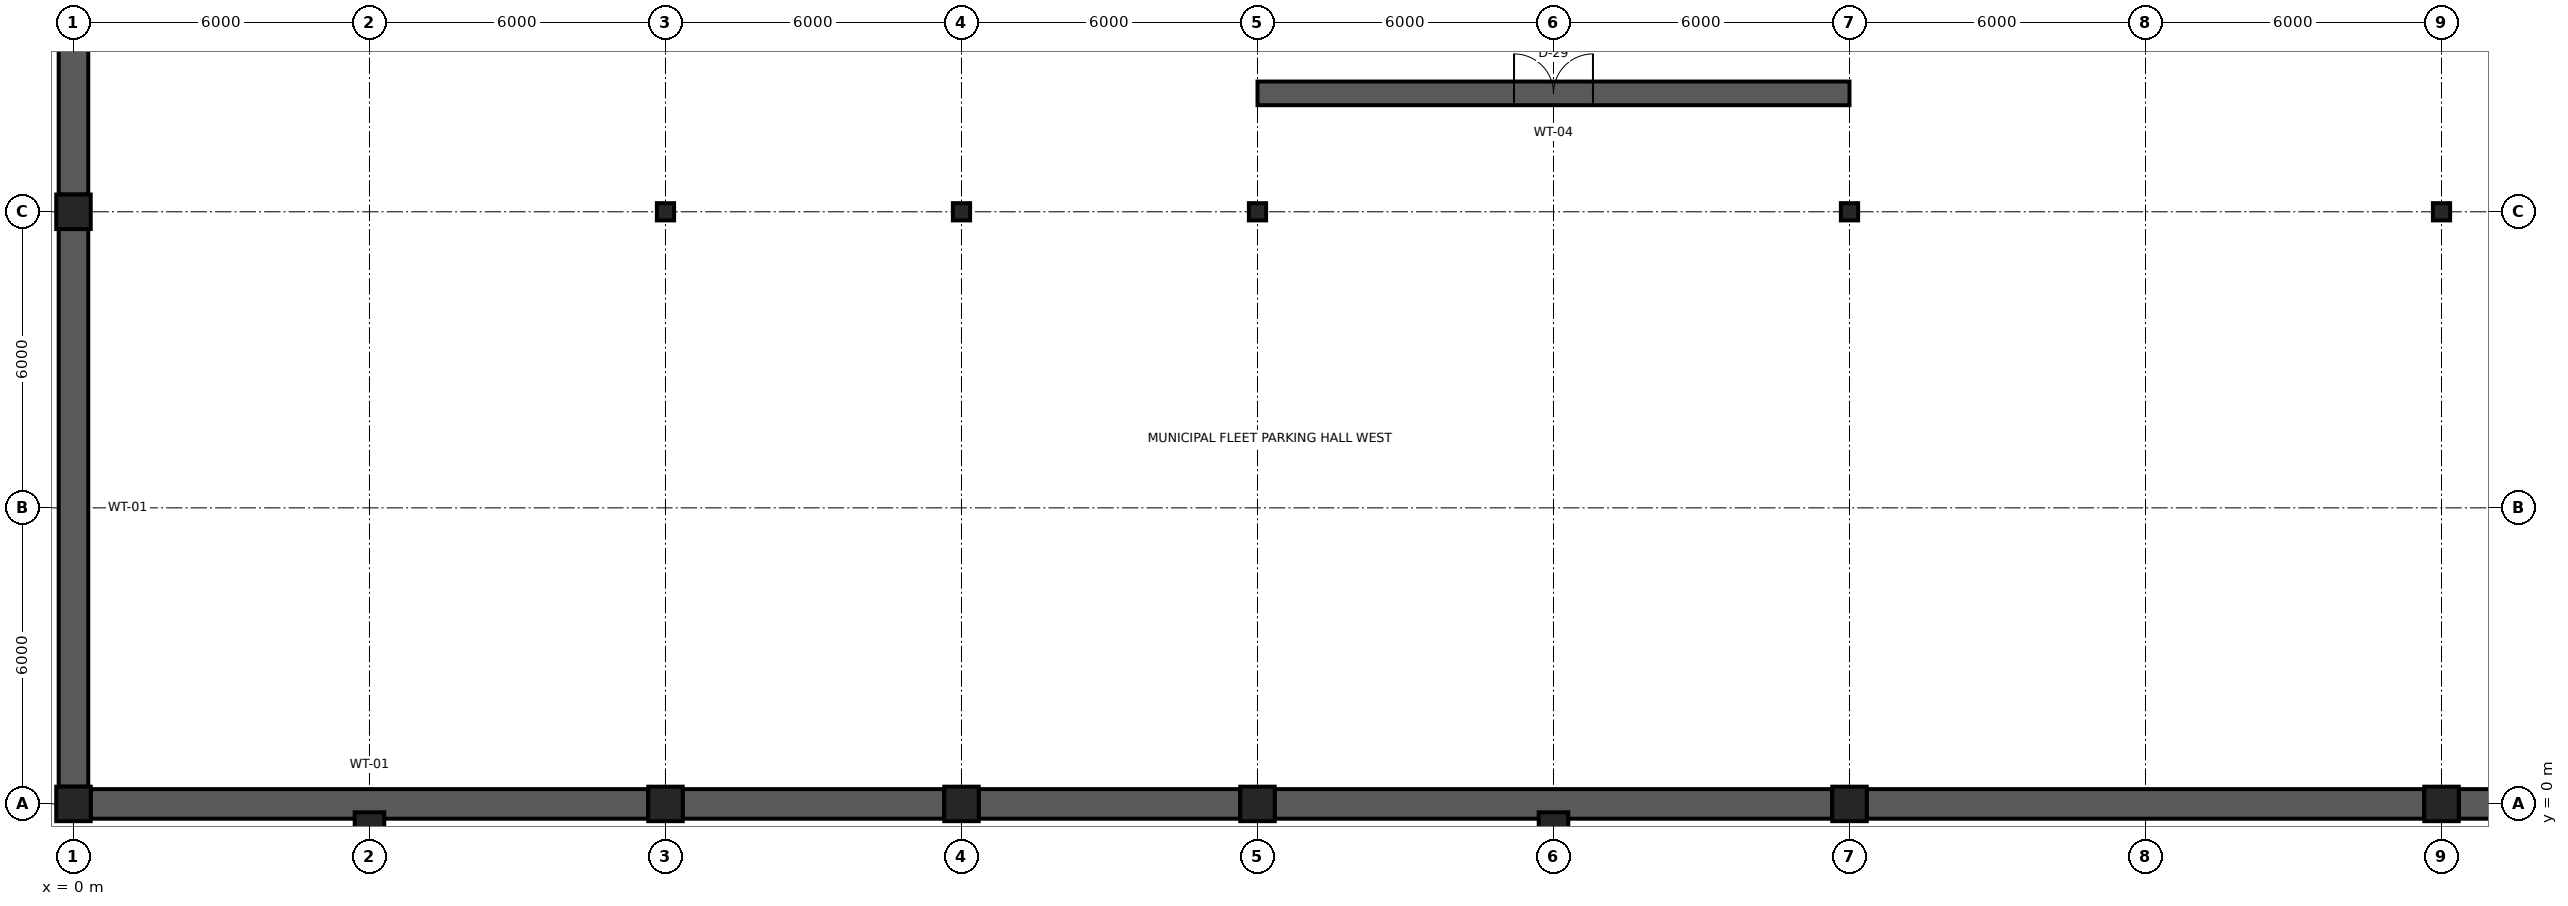
"""IFC4 building model, lengths in metres.
Left out: names, types, materials, properties, quantities, classifications, styles, units other than length and angle.
Written with IfcOpenShell. Run it as: python <this file> out.ifc"""

import sys

from ifc_helpers import new_model, si_unit, direction, frame, frame_2d, origin, origin_2d, place, context, subcontext, project, spatial, rectangle, i_section, extrude, element, fill, save


model = new_model("IFC4")
c1 = context("Model", 3, precision=1e-05, world=origin(), true_north=direction((0.0, 1.0)))
c2 = subcontext(c1, "Body", "Model", "MODEL_VIEW")
j1 = project(units=[si_unit("LENGTHUNIT", "METRE"), si_unit("PLANEANGLEUNIT", "RADIAN")], contexts=[c1])
p1 = place(None, origin())
s1 = spatial("IfcSite", under=j1, at=p1, CompositionType="ELEMENT")
p2 = place(p1, origin())
s2 = spatial("IfcBuilding", under=s1, at=p2, CompositionType="ELEMENT")
p3 = place(p2, frame((0.0, 0.0, -4.8)))
s3 = spatial("IfcBuildingStorey", under=s2, at=p3, CompositionType="ELEMENT", Elevation=-4.8)
for number, where, z_axis, x_axis in (
    (1, (0.0, 0.0, 0.0), (0.0, 0.0, 1.0), (1.0, 0.0, 0.0)),
    (2, (12.0, 0.0, 0.0), (0.0, 0.0, 1.0), (1.0, 0.0, 0.0)),
    (3, (18.0, 0.0, 0.0), (0.0, 0.0, 1.0), (1.0, 0.0, 0.0)),
    (4, (24.0, 0.0, 0.0), (0.0, 0.0, 1.0), (1.0, 0.0, 0.0)),
    (5, (36.0, 0.0, 0.0), (0.0, 0.0, 1.0), (1.0, 0.0, 0.0)),
    (6, (48.0, 0.0, 0.0), (0.0, 0.0, 1.0), (1.0, 0.0, 0.0)),
    (7, (0.0, 12.0, 0.0), (0.0, 0.0, 1.0), (1.0, 0.0, 0.0)),
):
    element("IfcColumn", number, at=place(p3, frame(where, z_axis=z_axis, x_axis=x_axis)), inside=s3, PredefinedType="COLUMN", context=c2, shape_type="SweptSolid", body=[
        extrude(rectangle(XDim=0.7, YDim=0.7, at=origin_2d()), origin(), (0.0, 0.0, 1.0), 4.8),
    ])
for number, where, z_axis, x_axis in (
    (8, (12.0, 12.0, 0.0), (0.0, 0.0, 1.0), (1.0, 0.0, 0.0)),
    (9, (18.0, 12.0, 0.0), (0.0, 0.0, 1.0), (1.0, 0.0, 0.0)),
    (10, (24.0, 12.0, 0.0), (0.0, 0.0, 1.0), (1.0, 0.0, 0.0)),
    (11, (36.0, 12.0, 0.0), (0.0, 0.0, 1.0), (1.0, 0.0, 0.0)),
    (12, (48.0, 12.0, 0.0), (0.0, 0.0, 1.0), (1.0, 0.0, 0.0)),
):
    element("IfcColumn", number, at=place(p3, frame(where, z_axis=z_axis, x_axis=x_axis)), inside=s3, PredefinedType="COLUMN", context=c2, shape_type="SweptSolid", body=[
        extrude(i_section(OverallWidth=0.35, OverallDepth=0.35, WebThickness=0.012, FlangeThickness=0.019, FilletRadius=0.02, at=origin_2d()), origin(), (0.0, 0.0, 1.0), 4.8),
    ])
for number, where, z_axis, x_axis in (
    (13, (6.0, -0.35, 0.0), (0.0, 0.0, 1.0), (1.0, 0.0, 0.0)),
    (14, (30.0, -0.35, 0.0), (0.0, 0.0, 1.0), (1.0, 0.0, 0.0)),
):
    element("IfcColumn", number, at=place(p3, frame(where, z_axis=z_axis, x_axis=x_axis)), inside=s3, PredefinedType="PILASTER", context=c2, shape_type="SweptSolid", body=[
        extrude(rectangle(XDim=0.6, YDim=0.36, at=origin_2d()), origin(), (0.0, 0.0, 1.0), 4.8),
    ])
p4 = place(p3, frame((0.35, 0.0, 0.0), z_axis=(0.0, 0.0, 1.0), x_axis=(1.0, 0.0, 0.0)))
e15 = element("IfcWall", 15, at=p4, inside=s3, PredefinedType="SHEAR", context=c2, shape_type="SweptSolid", body=[
    extrude(rectangle(XDim=11.3, YDim=0.6, at=frame_2d((5.65, 0.0))), origin(), (0.0, 0.0, 1.0), 4.48),
])
for number, where, z_axis, x_axis in (
    (16, (12.35, 0.0, 0.0), (0.0, 0.0, 1.0), (1.0, 0.0, 0.0)),
    (17, (18.35, 0.0, 0.0), (0.0, 0.0, 1.0), (1.0, 0.0, 0.0)),
):
    element("IfcWall", number, at=place(p3, frame(where, z_axis=z_axis, x_axis=x_axis)), inside=s3, PredefinedType="SHEAR", context=c2, shape_type="SweptSolid", body=[
        extrude(rectangle(XDim=5.3, YDim=0.6, at=frame_2d((2.65, 0.0))), origin(), (0.0, 0.0, 1.0), 4.48),
    ])
for number, where, z_axis, x_axis in (
    (18, (24.35, 0.0, 0.0), (0.0, 0.0, 1.0), (1.0, 0.0, 0.0)),
    (19, (36.35, 0.0, 0.0), (0.0, 0.0, 1.0), (1.0, 0.0, 0.0)),
):
    element("IfcWall", number, at=place(p3, frame(where, z_axis=z_axis, x_axis=x_axis)), inside=s3, PredefinedType="SHEAR", context=c2, shape_type="SweptSolid", body=[
        extrude(rectangle(XDim=11.3, YDim=0.6, at=frame_2d((5.65, 0.0))), origin(), (0.0, 0.0, 1.0), 4.48),
    ])
p5 = place(p3, frame((48.35, 0.0, 0.0), z_axis=(0.0, 0.0, 1.0), x_axis=(1.0, 0.0, 0.0)))
e20 = element("IfcWall", 20, at=p5, inside=s3, PredefinedType="SHEAR", context=c2, shape_type="SweptSolid", body=[
    extrude(rectangle(XDim=5.3, YDim=0.6, at=frame_2d((2.65, 0.0))), origin(), (0.0, 0.0, 1.0), 4.48),
])
p6 = place(p3, frame((0.0, 0.35, 0.0), z_axis=(0.0, 0.0, 1.0), x_axis=(0.0, 1.0, 0.0)))
e21 = element("IfcWall", 21, at=p6, inside=s3, PredefinedType="SHEAR", context=c2, shape_type="SweptSolid", body=[
    extrude(rectangle(XDim=11.3, YDim=0.6, at=frame_2d((5.65, 0.0))), origin(), (0.0, 0.0, 1.0), 4.48),
])
p7 = place(p3, frame((0.0, 12.35, 0.0), z_axis=(0.0, 0.0, 1.0), x_axis=(0.0, 1.0, 0.0)))
e22 = element("IfcWall", 22, at=p7, inside=s3, PredefinedType="SHEAR", context=c2, shape_type="SweptSolid", body=[
    extrude(rectangle(XDim=5.3, YDim=0.6, at=frame_2d((2.65, 0.0))), origin(), (0.0, 0.0, 1.0), 4.48),
])
p8 = place(p3, frame((24.0, 14.4, 0.0), z_axis=(0.0, 0.0, 1.0), x_axis=(1.0, 0.0, 0.0)))
e23 = element("IfcWall", 23, at=p8, inside=s3, PredefinedType="SHEAR", context=c2, shape_type="SweptSolid", body=[
    extrude(rectangle(XDim=12.0, YDim=0.48, at=frame_2d((6.0, 0.0))), origin(), (0.0, 0.0, 1.0), 4.48),
])
p9 = place(p8, frame((5.2, 0.0, 0.0)))
e24 = element("IfcOpeningElement", 24, at=p9, cuts=e23, PredefinedType="OPENING", context=c2, shape_type="SweptSolid", body=[
    extrude(rectangle(XDim=1.6, YDim=2.25, at=frame_2d((0.8, 1.125))), frame((0.0, 0.255, 0.0), z_axis=(0.0, -1.0, 0.0), x_axis=(1.0, 0.0, 0.0)), (0.0, 0.0, 1.0), 0.51),
])
p10 = place(p9, origin())
e25 = element("IfcDoor", 25, at=p10, inside=s3, OperationType="DOUBLE_DOOR_SINGLE_SWING", PredefinedType="DOOR", context=c2, shape_type="SweptSolid", body=[
    extrude(rectangle(XDim=1.6, YDim=2.25, at=frame_2d((0.8, 1.125))), frame((0.0, 0.025, 0.0), z_axis=(0.0, -1.0, 0.0), x_axis=(1.0, 0.0, 0.0)), (0.0, 0.0, 1.0), 0.05),
])
fill(e24, e25)
save(model, sys.argv[1])
